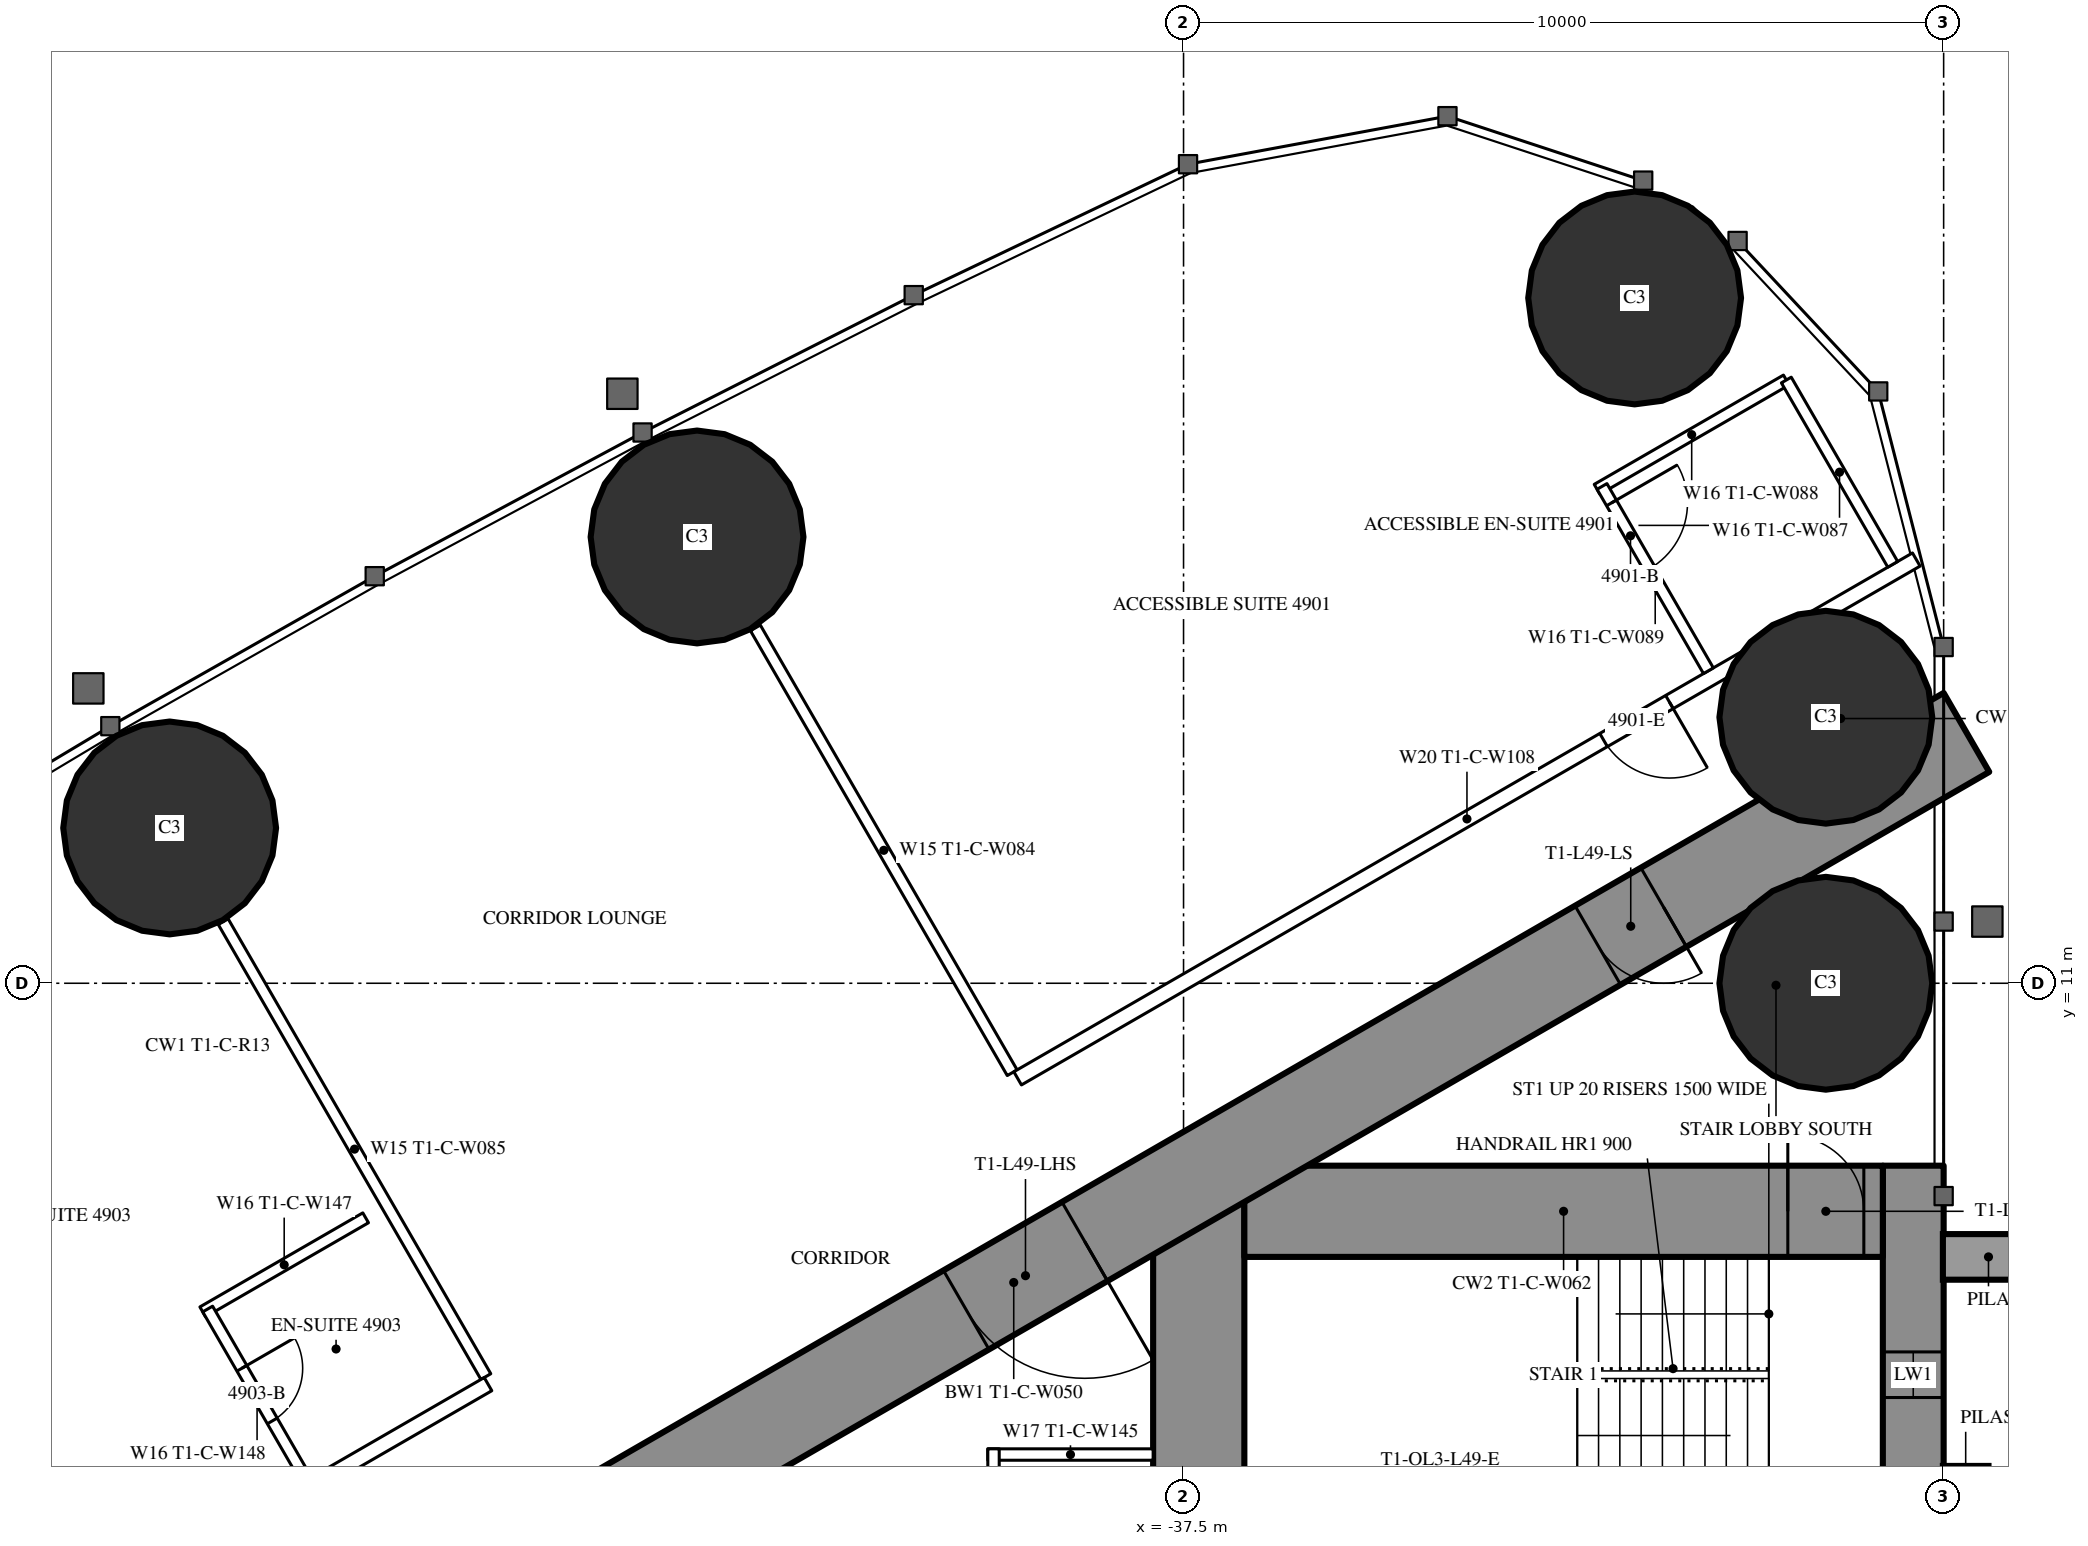
"""IFC4 building model, lengths in metres.
Left out: names, types, materials, properties, quantities, classifications, styles, units other than length and angle.
Written with IfcOpenShell. Run it as: python <this file> out.ifc"""

import sys

from ifc_helpers import new_model, si_unit, direction, frame, frame_2d, origin, origin_2d, place, context, subcontext, project, spatial, rectangle, circle, extrude, element, fill, save


model = new_model("IFC4")
c1 = context("Model", 3, precision=1e-05, world=origin(), true_north=direction((0.0, 1.0)))
c2 = subcontext(c1, "Body", "Model", "MODEL_VIEW")
j1 = project(units=[si_unit("LENGTHUNIT", "METRE"), si_unit("PLANEANGLEUNIT", "RADIAN")], contexts=[c1])
p1 = place(None, origin())
s1 = spatial("IfcSite", under=j1, at=p1, CompositionType="ELEMENT")
p2 = place(p1, origin())
s2 = spatial("IfcBuilding", under=s1, at=p2, CompositionType="ELEMENT")
p3 = place(p2, frame((0.0, 0.0, 184.3)))
s3 = spatial("IfcBuildingStorey", under=s2, at=p3, CompositionType="ELEMENT", Elevation=184.3)
for number, where, z_axis, x_axis in (
    (1, (-31.565, 20.016, 0.0), (0.0, 0.0, 1.0), (1.0, 0.0, 0.0)),
    (2, (-29.05, 11.0, 0.0), (0.0, 0.0, 1.0), (1.0, 0.0, 0.0)),
    (3, (-29.05, 14.5, 0.0), (0.0, 0.0, 1.0), (1.0, 0.0, 0.0)),
    (4, (-43.9, 16.871, 0.0), (0.0, 0.0, 1.0), (1.0, 0.0, 0.0)),
    (5, (-50.839, 13.043, 0.0), (0.0, 0.0, 1.0), (1.0, 0.0, 0.0)),
):
    element("IfcColumn", number, at=place(p3, frame(where, z_axis=z_axis, x_axis=x_axis)), inside=s3, PredefinedType="COLUMN", context=c2, shape_type="SweptSolid", body=[
        extrude(circle(Radius=1.4, at=origin_2d()), origin(), (0.0, 0.0, 1.0), 3.5),
    ])
p4 = place(p3, frame((-27.9, 8.6, 0.0), z_axis=(0.0, 0.0, 1.0), x_axis=(0.0, -1.0, 0.0)))
e6 = element("IfcWall", 6, at=p4, inside=s3, PredefinedType="SHEAR", context=c2, shape_type="SweptSolid", body=[
    extrude(rectangle(XDim=17.2, YDim=0.8, at=frame_2d((8.6, 0.0))), origin(), (0.0, 0.0, 1.0), 3.5),
])
p5 = place(p4, frame((2.45, 0.0, 0.6)))
e7 = element("IfcOpeningElement", 7, at=p5, cuts=e6, PredefinedType="OPENING", context=c2, shape_type="SweptSolid", body=[
    extrude(rectangle(XDim=0.6, YDim=2.1, at=frame_2d((0.3, 1.05))), frame((0.0, 0.41, 0.0), z_axis=(0.0, -1.0, 0.0), x_axis=(1.0, 0.0, 0.0)), (0.0, 0.0, 1.0), 0.82),
])
p6 = place(p4, frame((14.15, 0.0, 0.6)))
e8 = element("IfcOpeningElement", 8, at=p6, cuts=e6, PredefinedType="OPENING", context=c2, shape_type="SweptSolid", body=[
    extrude(rectangle(XDim=0.6, YDim=2.1, at=frame_2d((0.3, 1.05))), frame((0.0, 0.41, 0.0), z_axis=(0.0, -1.0, 0.0), x_axis=(1.0, 0.0, 0.0)), (0.0, 0.0, 1.0), 0.82),
])
p7 = place(p3, frame((-37.3, 8.6, 0.0), z_axis=(0.0, 0.0, 1.0), x_axis=(0.0, -1.0, 0.0)))
e9 = element("IfcWall", 9, at=p7, inside=s3, PredefinedType="SHEAR", context=c2, shape_type="SweptSolid", body=[
    extrude(rectangle(XDim=17.2, YDim=1.2, at=frame_2d((8.6, 0.0))), origin(), (0.0, 0.0, 1.0), 3.5),
])
p8 = place(p7, frame((7.7, 0.0, 0.0)))
e10 = element("IfcOpeningElement", 10, at=p8, cuts=e9, PredefinedType="OPENING", context=c2, shape_type="SweptSolid", body=[
    extrude(rectangle(XDim=1.8, YDim=2.2, at=frame_2d((0.9, 1.1))), frame((0.0, 0.61, 0.0), z_axis=(0.0, -1.0, 0.0), x_axis=(1.0, 0.0, 0.0)), (0.0, 0.0, 1.0), 1.22),
])
p9 = place(p3, frame((-28.3, 8.0, 0.0), z_axis=(0.0, 0.0, 1.0), x_axis=(-1.0, 0.0, 0.0)))
e11 = element("IfcWall", 11, at=p9, inside=s3, PredefinedType="SHEAR", context=c2, shape_type="SweptSolid", body=[
    extrude(rectangle(XDim=8.4, YDim=1.2, at=frame_2d((4.2, 0.0))), origin(), (0.0, 0.0, 1.0), 3.5),
])
p10 = place(p9, frame((0.25, 0.0, 0.0)))
e12 = element("IfcOpeningElement", 12, at=p10, cuts=e11, PredefinedType="OPENING", context=c2, shape_type="SweptSolid", body=[
    extrude(rectangle(XDim=1.0, YDim=2.2, at=frame_2d((0.5, 1.1))), frame((0.0, 0.61, 0.0), z_axis=(0.0, -1.0, 0.0), x_axis=(1.0, 0.0, 0.0)), (0.0, 0.0, 1.0), 1.22),
])
p11 = place(p3, frame((-27.2, 14.3, 0.0), z_axis=(0.0, 0.0, 1.0), x_axis=(-0.866026593062, -0.499997940104, 0.0)))
e13 = element("IfcWall", 13, at=p11, inside=s3, PredefinedType="SHEAR", context=c2, shape_type="SweptSolid", body=[
    extrude(rectangle(XDim=28.946, YDim=1.2, at=frame_2d((14.473, 0.0))), origin(), (0.0, 0.0, 1.0), 3.5),
])
p12 = place(p11, frame((4.6, 0.0, 0.0)))
e14 = element("IfcOpeningElement", 14, at=p12, cuts=e13, PredefinedType="OPENING", context=c2, shape_type="SweptSolid", body=[
    extrude(rectangle(XDim=1.0, YDim=2.2, at=frame_2d((0.5, 1.1))), frame((0.0, 0.61, 0.0), z_axis=(0.0, -1.0, 0.0), x_axis=(1.0, 0.0, 0.0)), (0.0, 0.0, 1.0), 1.22),
])
p13 = place(p11, frame((13.395, 0.0, 0.0)))
e15 = element("IfcOpeningElement", 15, at=p13, cuts=e13, PredefinedType="OPENING", context=c2, shape_type="SweptSolid", body=[
    extrude(rectangle(XDim=1.8, YDim=2.2, at=frame_2d((0.9, 1.1))), frame((0.0, 0.61, 0.0), z_axis=(0.0, -1.0, 0.0), x_axis=(1.0, 0.0, 0.0)), (0.0, 0.0, 1.0), 1.22),
])
p14 = place(p3, frame((-39.754, 9.823, 0.0), z_axis=(0.0, 0.0, 1.0), x_axis=(-0.499997670926, 0.866026748472, 0.0)))
e16 = element("IfcWall", 16, at=p14, inside=s3, PredefinedType="PARTITIONING", context=c2, shape_type="SweptSolid", body=[
    extrude(rectangle(XDim=6.757, YDim=0.15, at=frame_2d((3.379, 0.0))), origin(), (0.0, 0.0, 1.0), 2.3),
])
p15 = place(p3, frame((-46.679, 5.825, 0.0), z_axis=(0.0, 0.0, 1.0), x_axis=(-0.500006839597, 0.866021454905, 0.0)))
e17 = element("IfcWall", 17, at=p15, inside=s3, PredefinedType="PARTITIONING", context=c2, shape_type="SweptSolid", body=[
    extrude(rectangle(XDim=6.911, YDim=0.15, at=frame_2d((3.456, 0.0))), origin(), (0.0, 0.0, 1.0), 2.3),
])
p16 = place(p3, frame((-27.86, 16.575, 0.0), z_axis=(0.0, 0.0, 1.0), x_axis=(-0.866026850238, -0.499997494661, 0.0)))
e18 = element("IfcWall", 18, at=p16, inside=s3, PredefinedType="PARTITIONING", context=c2, shape_type="SweptSolid", body=[
    extrude(rectangle(XDim=13.651, YDim=0.2, at=frame_2d((6.826, 0.0))), origin(), (0.0, 0.0, 1.0), 3.25),
])
p17 = place(p16, frame((3.75, 0.0, 0.0)))
e19 = element("IfcOpeningElement", 19, at=p17, cuts=e18, PredefinedType="OPENING", context=c2, shape_type="SweptSolid", body=[
    extrude(rectangle(XDim=1.0, YDim=2.2, at=frame_2d((0.5, 1.1))), frame((0.0, 0.11, 0.0), z_axis=(0.0, -1.0, 0.0), x_axis=(1.0, 0.0, 0.0)), (0.0, 0.0, 1.0), 0.22),
])
p18 = place(p3, frame((-46.65, 5.726, 0.0), z_axis=(0.0, 0.0, 1.0), x_axis=(-0.866027963864, -0.499995565786, 0.0)))
e20 = element("IfcWall", 20, at=p18, inside=s3, PredefinedType="PARTITIONING", context=c2, shape_type="SweptSolid", body=[
    extrude(rectangle(XDim=11.452, YDim=0.2, at=frame_2d((5.726, 0.0))), origin(), (0.0, 0.0, 1.0), 3.25),
])
p19 = place(p18, frame((2.95, 0.0, 0.0)))
e21 = element("IfcOpeningElement", 21, at=p19, cuts=e20, PredefinedType="OPENING", context=c2, shape_type="SweptSolid", body=[
    extrude(rectangle(XDim=0.95, YDim=2.2, at=frame_2d((0.475, 1.1))), frame((0.0, 0.11, 0.0), z_axis=(0.0, -1.0, 0.0), x_axis=(1.0, 0.0, 0.0)), (0.0, 0.0, 1.0), 0.22),
])
p20 = place(p18, frame((8.344, 0.0, 0.0)))
e22 = element("IfcOpeningElement", 22, at=p20, cuts=e20, PredefinedType="OPENING", context=c2, shape_type="SweptSolid", body=[
    extrude(rectangle(XDim=0.95, YDim=2.2, at=frame_2d((0.475, 1.1))), frame((0.0, 0.11, 0.0), z_axis=(0.0, -1.0, 0.0), x_axis=(1.0, 0.0, 0.0)), (0.0, 0.0, 1.0), 0.22),
])
p21 = place(p3, frame((-29.57, 18.936, 0.0), z_axis=(0.0, 0.0, 1.0), x_axis=(-0.866018712932, -0.500011588718, 0.0)))
e23 = element("IfcWall", 23, at=p21, inside=s3, PredefinedType="PARTITIONING", context=c2, shape_type="SweptSolid", body=[
    extrude(rectangle(XDim=2.875, YDim=0.15, at=frame_2d((1.438, 0.0))), origin(), (0.0, 0.0, 1.0), 3.25),
])
p22 = place(p3, frame((-30.595, 15.111, 0.0), z_axis=(0.0, 0.0, 1.0), x_axis=(-0.49998411664, 0.866034573852, 0.0)))
e24 = element("IfcWall", 24, at=p22, inside=s3, PredefinedType="PARTITIONING", context=c2, shape_type="SweptSolid", body=[
    extrude(rectangle(XDim=2.8, YDim=0.15, at=frame_2d((1.4, 0.0))), origin(), (0.0, 0.0, 1.0), 3.25),
])
p23 = place(p22, frame((1.55, 0.0, 0.0)))
e25 = element("IfcOpeningElement", 25, at=p23, cuts=e24, PredefinedType="OPENING", context=c2, shape_type="SweptSolid", body=[
    extrude(rectangle(XDim=1.0, YDim=2.2, at=frame_2d((0.5, 1.1))), frame((0.0, 0.085, 0.0), z_axis=(0.0, -1.0, 0.0), x_axis=(1.0, 0.0, 0.0)), (0.0, 0.0, 1.0), 0.17),
])
p24 = place(p3, frame((-28.17, 16.511, 0.0), z_axis=(0.0, 0.0, 1.0), x_axis=(-0.49994636267, 0.866056369097, 0.0)))
e26 = element("IfcWall", 26, at=p24, inside=s3, PredefinedType="PARTITIONING", context=c2, shape_type="SweptSolid", body=[
    extrude(rectangle(XDim=2.8, YDim=0.15, at=frame_2d((1.4, 0.0))), origin(), (0.0, 0.0, 1.0), 3.25),
])
p25 = place(p3, frame((-48.26, 7.914, 0.0), z_axis=(0.0, 0.0, 1.0), x_axis=(-0.866031185235, -0.4999899861, 0.0)))
e27 = element("IfcWall", 27, at=p25, inside=s3, PredefinedType="PARTITIONING", context=c2, shape_type="SweptSolid", body=[
    extrude(rectangle(XDim=2.475, YDim=0.15, at=frame_2d((1.238, 0.0))), origin(), (0.0, 0.0, 1.0), 3.25),
])
p26 = place(p3, frame((-49.039, 4.463, 0.0), z_axis=(0.0, 0.0, 1.0), x_axis=(-0.499936506574, 0.866062058628, 0.0)))
e28 = element("IfcWall", 28, at=p26, inside=s3, PredefinedType="PARTITIONING", context=c2, shape_type="SweptSolid", body=[
    extrude(rectangle(XDim=2.6, YDim=0.15, at=frame_2d((1.3, 0.0))), origin(), (0.0, 0.0, 1.0), 3.25),
])
p27 = place(p26, frame((0.9, 0.0, 0.0)))
e29 = element("IfcOpeningElement", 29, at=p27, cuts=e28, PredefinedType="OPENING", context=c2, shape_type="SweptSolid", body=[
    extrude(rectangle(XDim=0.8, YDim=2.2, at=frame_2d((0.4, 1.1))), frame((0.0, 0.085, 0.0), z_axis=(0.0, -1.0, 0.0), x_axis=(1.0, 0.0, 0.0)), (0.0, 0.0, 1.0), 0.17),
])
p28 = place(p3, frame((-37.9, 4.8, 0.0), z_axis=(0.0, 0.0, 1.0), x_axis=(-1.0, 0.0, 0.0)))
e30 = element("IfcWall", 30, at=p28, inside=s3, PredefinedType="PARTITIONING", context=c2, shape_type="SweptSolid", body=[
    extrude(rectangle(XDim=2.175, YDim=0.15, at=frame_2d((1.087, 0.0))), origin(), (0.0, 0.0, 1.0), 3.25),
])
p29 = place(p3, frame((-40.0, 4.875, 0.0), z_axis=(0.0, 0.0, 1.0), x_axis=(0.0, -1.0, 0.0)))
e31 = element("IfcWall", 31, at=p29, inside=s3, PredefinedType="PARTITIONING", context=c2, shape_type="SweptSolid", body=[
    extrude(rectangle(XDim=3.75, YDim=0.15, at=frame_2d((1.875, 0.0))), origin(), (0.0, 0.0, 1.0), 3.25),
])
p30 = place(p29, frame((1.375, 0.0, 0.0)))
e32 = element("IfcOpeningElement", 32, at=p30, cuts=e31, PredefinedType="OPENING", context=c2, shape_type="SweptSolid", body=[
    extrude(rectangle(XDim=1.0, YDim=2.2, at=frame_2d((0.5, 1.1))), frame((0.0, 0.085, 0.0), z_axis=(0.0, -1.0, 0.0), x_axis=(1.0, 0.0, 0.0)), (0.0, 0.0, 1.0), 0.17),
])
p31 = place(p23, origin())
e33 = element("IfcDoor", 33, at=p31, inside=s3, OperationType="SINGLE_SWING_RIGHT", PredefinedType="DOOR", context=c2, shape_type="SweptSolid", body=[
    extrude(rectangle(XDim=1.0, YDim=2.2, at=frame_2d((0.5, 1.1))), frame((0.0, 0.025, 0.0), z_axis=(0.0, -1.0, 0.0), x_axis=(1.0, 0.0, 0.0)), (0.0, 0.0, 1.0), 0.05),
])
fill(e25, e33)
p32 = place(p17, origin())
e34 = element("IfcDoor", 34, at=p32, inside=s3, OperationType="SINGLE_SWING_LEFT", PredefinedType="DOOR", context=c2, shape_type="SweptSolid", body=[
    extrude(rectangle(XDim=1.0, YDim=2.2, at=frame_2d((0.5, 1.1))), frame((0.0, 0.025, 0.0), z_axis=(0.0, -1.0, 0.0), x_axis=(1.0, 0.0, 0.0)), (0.0, 0.0, 1.0), 0.05),
])
fill(e19, e34)
p33 = place(p27, origin())
e35 = element("IfcDoor", 35, at=p33, inside=s3, OperationType="SINGLE_SWING_RIGHT", PredefinedType="DOOR", context=c2, shape_type="SweptSolid", body=[
    extrude(rectangle(XDim=0.8, YDim=2.2, at=frame_2d((0.4, 1.1))), frame((0.0, 0.025, 0.0), z_axis=(0.0, -1.0, 0.0), x_axis=(1.0, 0.0, 0.0)), (0.0, 0.0, 1.0), 0.05),
])
fill(e29, e35)
p34 = place(p12, origin())
e36 = element("IfcDoor", 36, at=p34, inside=s3, OperationType="SINGLE_SWING_LEFT", PredefinedType="DOOR", context=c2, shape_type="SweptSolid", body=[
    extrude(rectangle(XDim=1.0, YDim=2.2, at=frame_2d((0.5, 1.1))), frame((0.0, 0.025, 0.0), z_axis=(0.0, -1.0, 0.0), x_axis=(1.0, 0.0, 0.0)), (0.0, 0.0, 1.0), 0.05),
])
fill(e14, e36)
p35 = place(p13, origin())
e37 = element("IfcDoor", 37, at=p35, inside=s3, OperationType="DOUBLE_DOOR_SINGLE_SWING", PredefinedType="DOOR", context=c2, shape_type="SweptSolid", body=[
    extrude(rectangle(XDim=1.8, YDim=2.2, at=frame_2d((0.9, 1.1))), frame((0.0, 0.025, 0.0), z_axis=(0.0, -1.0, 0.0), x_axis=(1.0, 0.0, 0.0)), (0.0, 0.0, 1.0), 0.05),
])
fill(e15, e37)
p36 = place(p10, origin())
e38 = element("IfcDoor", 38, at=p36, inside=s3, OperationType="SINGLE_SWING_RIGHT", PredefinedType="DOOR", context=c2, shape_type="SweptSolid", body=[
    extrude(rectangle(XDim=1.0, YDim=2.2, at=frame_2d((0.5, 1.1))), frame((0.0, 0.025, 0.0), z_axis=(0.0, -1.0, 0.0), x_axis=(1.0, 0.0, 0.0)), (0.0, 0.0, 1.0), 0.05),
])
fill(e12, e38)
p37 = place(p5, origin())
e39 = element("IfcWindow", 39, at=p37, inside=s3, PartitioningType="SINGLE_PANEL", PredefinedType="WINDOW", context=c2, shape_type="SweptSolid", body=[
    extrude(rectangle(XDim=0.6, YDim=2.1, at=frame_2d((0.3, 1.05))), frame((0.0, 0.03, 0.0), z_axis=(0.0, -1.0, 0.0), x_axis=(1.0, 0.0, 0.0)), (0.0, 0.0, 1.0), 0.06),
])
fill(e7, e39)
save(model, sys.argv[1])
